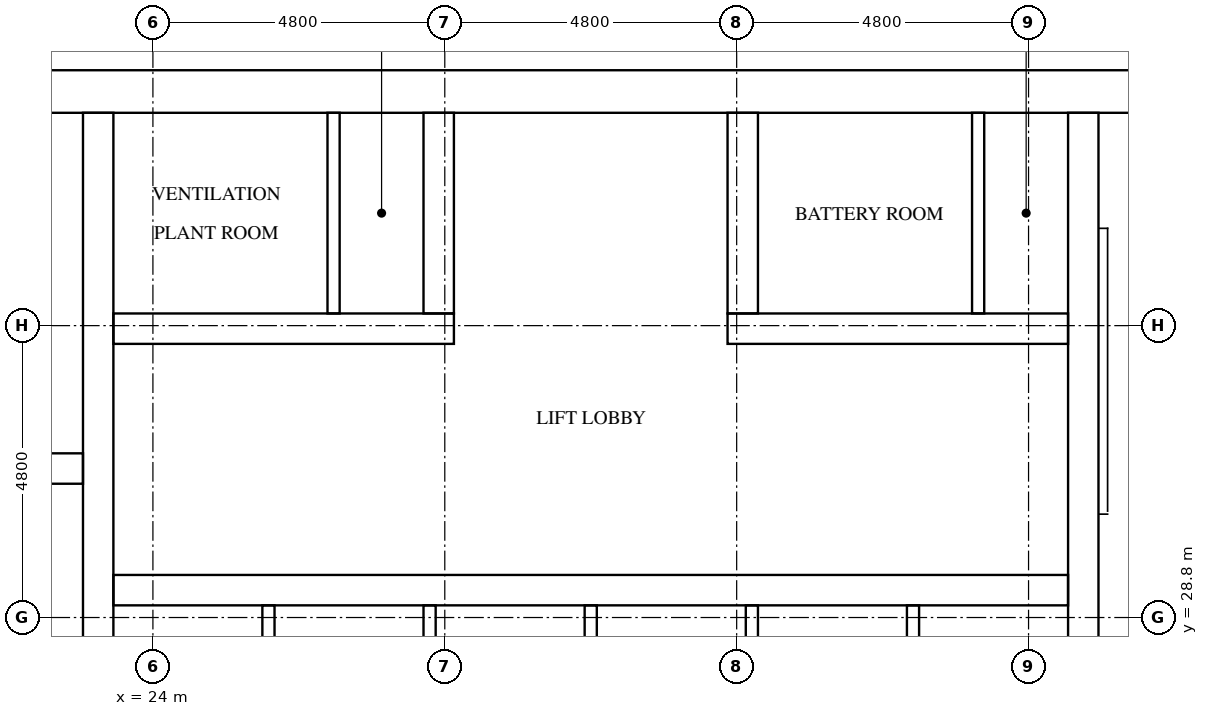
"""IFC4 building model, lengths in metres.
Left out: names, types, materials, properties, quantities, classifications, styles, units other than length and angle.
Written with IfcOpenShell. Run it as: python <this file> out.ifc"""

import sys

from ifc_helpers import new_model, si_unit, direction, frame, frame_2d, origin, place, context, subcontext, project, spatial, rectangle, extrude, element, fill, save


model = new_model("IFC4")
c1 = context("Model", 3, precision=1e-05, world=origin(), true_north=direction((0.0, 1.0)))
c2 = subcontext(c1, "Body", "Model", "MODEL_VIEW")
j1 = project(units=[si_unit("LENGTHUNIT", "METRE"), si_unit("PLANEANGLEUNIT", "RADIAN")], contexts=[c1])
p1 = place(None, origin())
s1 = spatial("IfcSite", under=j1, at=p1, CompositionType="ELEMENT")
p2 = place(p1, origin())
s2 = spatial("IfcBuilding", under=s1, at=p2, CompositionType="ELEMENT")
p3 = place(p2, frame((0.0, 0.0, 203.4)))
s3 = spatial("IfcBuildingStorey", under=s2, at=p3, CompositionType="ELEMENT", Elevation=203.4)
p4 = place(p3, frame((15.0, 37.45, 0.0), z_axis=(0.0, 0.0, 1.0), x_axis=(1.0, 0.0, 0.0)))
e1 = element("IfcWall", 1, at=p4, inside=s3, PredefinedType="SHEAR", context=c2, shape_type="SweptSolid", body=[
    extrude(rectangle(XDim=32.4, YDim=0.7, at=frame_2d((16.2, 0.0))), origin(), (0.0, 0.0, 1.0), 5.1),
])
p5 = place(p4, frame((15.3, 0.0, 0.0)))
e2 = element("IfcOpeningElement", 2, at=p5, cuts=e1, PredefinedType="OPENING", context=c2, shape_type="SweptSolid", body=[
    extrude(rectangle(XDim=1.8, YDim=2.1, at=frame_2d((0.9, 1.05))), frame((0.0, 0.36, 0.0), z_axis=(0.0, -1.0, 0.0), x_axis=(1.0, 0.0, 0.0)), (0.0, 0.0, 1.0), 0.72),
])
p6 = place(p4, frame((1.544, 0.0, 0.0)))
e3 = element("IfcOpeningElement", 3, at=p6, cuts=e1, PredefinedType="OPENING", context=c2, shape_type="SweptSolid", body=[
    extrude(rectangle(XDim=1.0, YDim=2.1, at=frame_2d((0.5, 1.05))), frame((0.0, 0.36, 0.0), z_axis=(0.0, -1.0, 0.0), x_axis=(1.0, 0.0, 0.0)), (0.0, 0.0, 1.0), 0.72),
])
p7 = place(p4, frame((5.219, 0.0, 0.0)))
e4 = element("IfcOpeningElement", 4, at=p7, cuts=e1, PredefinedType="OPENING", context=c2, shape_type="SweptSolid", body=[
    extrude(rectangle(XDim=1.0, YDim=2.1, at=frame_2d((0.5, 1.05))), frame((0.0, 0.36, 0.0), z_axis=(0.0, -1.0, 0.0), x_axis=(1.0, 0.0, 0.0)), (0.0, 0.0, 1.0), 0.72),
])
p8 = place(p3, frame((23.1, 15.7, 0.0), z_axis=(0.0, 0.0, 1.0), x_axis=(0.0, 1.0, 0.0)))
e5 = element("IfcWall", 5, at=p8, inside=s3, PredefinedType="SHEAR", context=c2, shape_type="SweptSolid", body=[
    extrude(rectangle(XDim=21.4, YDim=0.5, at=frame_2d((10.7, 0.0))), origin(), (0.0, 0.0, 1.0), 5.1),
])
p9 = place(p3, frame((39.3, 27.75, 0.0), z_axis=(0.0, 0.0, 1.0), x_axis=(0.0, 1.0, 0.0)))
e6 = element("IfcWall", 6, at=p9, inside=s3, PredefinedType="SHEAR", context=c2, shape_type="SweptSolid", body=[
    extrude(rectangle(XDim=9.35, YDim=0.5, at=frame_2d((4.675, 0.0))), origin(), (0.0, 0.0, 1.0), 5.1),
])
p10 = place(p3, frame((15.7, 31.25, 0.0), z_axis=(0.0, 0.0, 1.0), x_axis=(1.0, 0.0, 0.0)))
e7 = element("IfcWall", 7, at=p10, inside=s3, PredefinedType="SHEAR", context=c2, shape_type="SweptSolid", body=[
    extrude(rectangle(XDim=7.15, YDim=0.5, at=frame_2d((3.575, 0.0))), origin(), (0.0, 0.0, 1.0), 5.1),
])
p11 = place(p3, frame((23.35, 29.25, 0.0), z_axis=(0.0, 0.0, 1.0), x_axis=(1.0, 0.0, 0.0)))
e8 = element("IfcWall", 8, at=p11, inside=s3, PredefinedType="SHEAR", context=c2, shape_type="SweptSolid", body=[
    extrude(rectangle(XDim=15.7, YDim=0.5, at=frame_2d((7.85, 0.0))), origin(), (0.0, 0.0, 1.0), 5.1),
])
p12 = place(p11, frame((0.675, 0.0, 0.0)))
e9 = element("IfcOpeningElement", 9, at=p12, cuts=e8, PredefinedType="OPENING", context=c2, shape_type="SweptSolid", body=[
    extrude(rectangle(XDim=1.1, YDim=2.1, at=frame_2d((0.55, 1.05))), frame((0.0, 0.26, 0.0), z_axis=(0.0, -1.0, 0.0), x_axis=(1.0, 0.0, 0.0)), (0.0, 0.0, 1.0), 0.52),
])
p13 = place(p11, frame((3.325, 0.0, 0.0)))
e10 = element("IfcOpeningElement", 10, at=p13, cuts=e8, PredefinedType="OPENING", context=c2, shape_type="SweptSolid", body=[
    extrude(rectangle(XDim=1.1, YDim=2.1, at=frame_2d((0.55, 1.05))), frame((0.0, 0.26, 0.0), z_axis=(0.0, -1.0, 0.0), x_axis=(1.0, 0.0, 0.0)), (0.0, 0.0, 1.0), 0.52),
])
p14 = place(p11, frame((5.975, 0.0, 0.0)))
e11 = element("IfcOpeningElement", 11, at=p14, cuts=e8, PredefinedType="OPENING", context=c2, shape_type="SweptSolid", body=[
    extrude(rectangle(XDim=1.1, YDim=2.1, at=frame_2d((0.55, 1.05))), frame((0.0, 0.26, 0.0), z_axis=(0.0, -1.0, 0.0), x_axis=(1.0, 0.0, 0.0)), (0.0, 0.0, 1.0), 0.52),
])
p15 = place(p11, frame((8.625, 0.0, 0.0)))
e12 = element("IfcOpeningElement", 12, at=p15, cuts=e8, PredefinedType="OPENING", context=c2, shape_type="SweptSolid", body=[
    extrude(rectangle(XDim=1.1, YDim=2.1, at=frame_2d((0.55, 1.05))), frame((0.0, 0.26, 0.0), z_axis=(0.0, -1.0, 0.0), x_axis=(1.0, 0.0, 0.0)), (0.0, 0.0, 1.0), 0.52),
])
p16 = place(p11, frame((11.275, 0.0, 0.0)))
e13 = element("IfcOpeningElement", 13, at=p16, cuts=e8, PredefinedType="OPENING", context=c2, shape_type="SweptSolid", body=[
    extrude(rectangle(XDim=1.1, YDim=2.1, at=frame_2d((0.55, 1.05))), frame((0.0, 0.26, 0.0), z_axis=(0.0, -1.0, 0.0), x_axis=(1.0, 0.0, 0.0)), (0.0, 0.0, 1.0), 0.52),
])
p17 = place(p11, frame((13.925, 0.0, 0.0)))
e14 = element("IfcOpeningElement", 14, at=p17, cuts=e8, PredefinedType="OPENING", context=c2, shape_type="SweptSolid", body=[
    extrude(rectangle(XDim=1.1, YDim=2.1, at=frame_2d((0.55, 1.05))), frame((0.0, 0.26, 0.0), z_axis=(0.0, -1.0, 0.0), x_axis=(1.0, 0.0, 0.0)), (0.0, 0.0, 1.0), 0.52),
])
p18 = place(p3, frame((23.35, 33.55, 0.0), z_axis=(0.0, 0.0, 1.0), x_axis=(1.0, 0.0, 0.0)))
e15 = element("IfcWall", 15, at=p18, inside=s3, PredefinedType="SHEAR", context=c2, shape_type="SweptSolid", body=[
    extrude(rectangle(XDim=5.6, YDim=0.5, at=frame_2d((2.8, 0.0))), origin(), (0.0, 0.0, 1.0), 5.1),
])
p19 = place(p18, frame((1.26, 0.0, 0.0)))
e16 = element("IfcOpeningElement", 16, at=p19, cuts=e15, PredefinedType="OPENING", context=c2, shape_type="SweptSolid", body=[
    extrude(rectangle(XDim=1.0, YDim=2.1, at=frame_2d((0.5, 1.05))), frame((0.0, 0.26, 0.0), z_axis=(0.0, -1.0, 0.0), x_axis=(1.0, 0.0, 0.0)), (0.0, 0.0, 1.0), 0.52),
])
p20 = place(p18, frame((3.91, 0.0, 0.0)))
e17 = element("IfcOpeningElement", 17, at=p20, cuts=e15, PredefinedType="OPENING", context=c2, shape_type="SweptSolid", body=[
    extrude(rectangle(XDim=1.0, YDim=2.1, at=frame_2d((0.5, 1.05))), frame((0.0, 0.26, 0.0), z_axis=(0.0, -1.0, 0.0), x_axis=(1.0, 0.0, 0.0)), (0.0, 0.0, 1.0), 0.52),
])
p21 = place(p3, frame((33.45, 33.55, 0.0), z_axis=(0.0, 0.0, 1.0), x_axis=(1.0, 0.0, 0.0)))
e18 = element("IfcWall", 18, at=p21, inside=s3, PredefinedType="SHEAR", context=c2, shape_type="SweptSolid", body=[
    extrude(rectangle(XDim=5.6, YDim=0.5, at=frame_2d((2.8, 0.0))), origin(), (0.0, 0.0, 1.0), 5.1),
])
p22 = place(p21, frame((1.76, 0.0, 0.0)))
e19 = element("IfcOpeningElement", 19, at=p22, cuts=e18, PredefinedType="OPENING", context=c2, shape_type="SweptSolid", body=[
    extrude(rectangle(XDim=1.0, YDim=2.1, at=frame_2d((0.5, 1.05))), frame((0.0, 0.26, 0.0), z_axis=(0.0, -1.0, 0.0), x_axis=(1.0, 0.0, 0.0)), (0.0, 0.0, 1.0), 0.52),
])
p23 = place(p21, frame((4.41, 0.0, 0.0)))
e20 = element("IfcOpeningElement", 20, at=p23, cuts=e18, PredefinedType="OPENING", context=c2, shape_type="SweptSolid", body=[
    extrude(rectangle(XDim=1.0, YDim=2.1, at=frame_2d((0.5, 1.05))), frame((0.0, 0.26, 0.0), z_axis=(0.0, -1.0, 0.0), x_axis=(1.0, 0.0, 0.0)), (0.0, 0.0, 1.0), 0.52),
])
for number, where, z_axis, x_axis in (
    (21, (28.7, 33.8, 0.0), (0.0, 0.0, 1.0), (0.0, 1.0, 0.0)),
    (22, (33.7, 33.8, 0.0), (0.0, 0.0, 1.0), (0.0, 1.0, 0.0)),
):
    element("IfcWall", number, at=place(p3, frame(where, z_axis=z_axis, x_axis=x_axis)), inside=s3, PredefinedType="SHEAR", context=c2, shape_type="SweptSolid", body=[
        extrude(rectangle(XDim=3.3, YDim=0.5, at=frame_2d((1.65, 0.0))), origin(), (0.0, 0.0, 1.0), 5.1),
    ])
for number, where, z_axis, x_axis in (
    (23, (25.9, 26.4, 0.0), (0.0, 0.0, 1.0), (0.0, 1.0, 0.0)),
    (24, (28.55, 26.4, 0.0), (0.0, 0.0, 1.0), (0.0, 1.0, 0.0)),
    (25, (31.2, 26.4, 0.0), (0.0, 0.0, 1.0), (0.0, 1.0, 0.0)),
    (26, (33.85, 26.4, 0.0), (0.0, 0.0, 1.0), (0.0, 1.0, 0.0)),
    (27, (36.5, 26.4, 0.0), (0.0, 0.0, 1.0), (0.0, 1.0, 0.0)),
):
    element("IfcWall", number, at=place(p3, frame(where, z_axis=z_axis, x_axis=x_axis)), inside=s3, PredefinedType="SOLIDWALL", context=c2, shape_type="SweptSolid", body=[
        extrude(rectangle(XDim=2.6, YDim=0.2, at=frame_2d((1.3, 0.0))), origin(), (0.0, 0.0, 1.0), 5.1),
    ])
for number, where, z_axis, x_axis in (
    (28, (26.971, 33.8, 0.0), (0.0, 0.0, 1.0), (0.0, 1.0, 0.0)),
    (29, (37.571, 33.8, 0.0), (0.0, 0.0, 1.0), (0.0, 1.0, 0.0)),
):
    element("IfcWall", number, at=place(p3, frame(where, z_axis=z_axis, x_axis=x_axis)), inside=s3, PredefinedType="PARTITIONING", context=c2, shape_type="SweptSolid", body=[
        extrude(rectangle(XDim=3.3, YDim=0.2, at=frame_2d((1.65, 0.0))), origin(), (0.0, 0.0, 1.0), 5.1),
    ])
p24 = place(p12, origin())
e30 = element("IfcDoor", 30, at=p24, inside=s3, OperationType="DOUBLE_DOOR_SLIDING", PredefinedType="DOOR", context=c2, shape_type="SweptSolid", body=[
    extrude(rectangle(XDim=1.1, YDim=2.1, at=frame_2d((0.55, 1.05))), frame((0.0, 0.025, 0.0), z_axis=(0.0, -1.0, 0.0), x_axis=(1.0, 0.0, 0.0)), (0.0, 0.0, 1.0), 0.05),
])
fill(e9, e30)
p25 = place(p13, origin())
e31 = element("IfcDoor", 31, at=p25, inside=s3, OperationType="DOUBLE_DOOR_SLIDING", PredefinedType="DOOR", context=c2, shape_type="SweptSolid", body=[
    extrude(rectangle(XDim=1.1, YDim=2.1, at=frame_2d((0.55, 1.05))), frame((0.0, 0.025, 0.0), z_axis=(0.0, -1.0, 0.0), x_axis=(1.0, 0.0, 0.0)), (0.0, 0.0, 1.0), 0.05),
])
fill(e10, e31)
p26 = place(p14, origin())
e32 = element("IfcDoor", 32, at=p26, inside=s3, OperationType="DOUBLE_DOOR_SLIDING", PredefinedType="DOOR", context=c2, shape_type="SweptSolid", body=[
    extrude(rectangle(XDim=1.1, YDim=2.1, at=frame_2d((0.55, 1.05))), frame((0.0, 0.025, 0.0), z_axis=(0.0, -1.0, 0.0), x_axis=(1.0, 0.0, 0.0)), (0.0, 0.0, 1.0), 0.05),
])
fill(e11, e32)
p27 = place(p15, origin())
e33 = element("IfcDoor", 33, at=p27, inside=s3, OperationType="DOUBLE_DOOR_SLIDING", PredefinedType="DOOR", context=c2, shape_type="SweptSolid", body=[
    extrude(rectangle(XDim=1.1, YDim=2.1, at=frame_2d((0.55, 1.05))), frame((0.0, 0.025, 0.0), z_axis=(0.0, -1.0, 0.0), x_axis=(1.0, 0.0, 0.0)), (0.0, 0.0, 1.0), 0.05),
])
fill(e12, e33)
p28 = place(p16, origin())
e34 = element("IfcDoor", 34, at=p28, inside=s3, OperationType="DOUBLE_DOOR_SLIDING", PredefinedType="DOOR", context=c2, shape_type="SweptSolid", body=[
    extrude(rectangle(XDim=1.1, YDim=2.1, at=frame_2d((0.55, 1.05))), frame((0.0, 0.025, 0.0), z_axis=(0.0, -1.0, 0.0), x_axis=(1.0, 0.0, 0.0)), (0.0, 0.0, 1.0), 0.05),
])
fill(e13, e34)
p29 = place(p17, origin())
e35 = element("IfcDoor", 35, at=p29, inside=s3, OperationType="DOUBLE_DOOR_SLIDING", PredefinedType="DOOR", context=c2, shape_type="SweptSolid", body=[
    extrude(rectangle(XDim=1.1, YDim=2.1, at=frame_2d((0.55, 1.05))), frame((0.0, 0.025, 0.0), z_axis=(0.0, -1.0, 0.0), x_axis=(1.0, 0.0, 0.0)), (0.0, 0.0, 1.0), 0.05),
])
fill(e14, e35)
p30 = place(p5, origin())
e36 = element("IfcDoor", 36, at=p30, inside=s3, OperationType="DOUBLE_DOOR_SINGLE_SWING", PredefinedType="DOOR", context=c2, shape_type="SweptSolid", body=[
    extrude(rectangle(XDim=1.8, YDim=2.1, at=frame_2d((0.9, 1.05))), frame((0.0, 0.025, 0.0), z_axis=(0.0, -1.0, 0.0), x_axis=(1.0, 0.0, 0.0)), (0.0, 0.0, 1.0), 0.05),
])
fill(e2, e36)
p31 = place(p19, frame((1.0, 0.0, 0.0), z_axis=(0.0, 0.0, 1.0), x_axis=(-1.0, 0.0, 0.0)))
e37 = element("IfcDoor", 37, at=p31, inside=s3, OperationType="SINGLE_SWING_LEFT", PredefinedType="DOOR", context=c2, shape_type="SweptSolid", body=[
    extrude(rectangle(XDim=1.0, YDim=2.1, at=frame_2d((0.5, 1.05))), frame((0.0, 0.025, 0.0), z_axis=(0.0, -1.0, 0.0), x_axis=(1.0, 0.0, 0.0)), (0.0, 0.0, 1.0), 0.05),
])
fill(e16, e37)
p32 = place(p20, frame((1.0, 0.0, 0.0), z_axis=(0.0, 0.0, 1.0), x_axis=(-1.0, 0.0, 0.0)))
e38 = element("IfcDoor", 38, at=p32, inside=s3, OperationType="SINGLE_SWING_RIGHT", PredefinedType="DOOR", context=c2, shape_type="SweptSolid", body=[
    extrude(rectangle(XDim=1.0, YDim=2.1, at=frame_2d((0.5, 1.05))), frame((0.0, 0.025, 0.0), z_axis=(0.0, -1.0, 0.0), x_axis=(1.0, 0.0, 0.0)), (0.0, 0.0, 1.0), 0.05),
])
fill(e17, e38)
p33 = place(p22, frame((1.0, 0.0, 0.0), z_axis=(0.0, 0.0, 1.0), x_axis=(-1.0, 0.0, 0.0)))
e39 = element("IfcDoor", 39, at=p33, inside=s3, OperationType="SINGLE_SWING_LEFT", PredefinedType="DOOR", context=c2, shape_type="SweptSolid", body=[
    extrude(rectangle(XDim=1.0, YDim=2.1, at=frame_2d((0.5, 1.05))), frame((0.0, 0.025, 0.0), z_axis=(0.0, -1.0, 0.0), x_axis=(1.0, 0.0, 0.0)), (0.0, 0.0, 1.0), 0.05),
])
fill(e19, e39)
p34 = place(p23, frame((1.0, 0.0, 0.0), z_axis=(0.0, 0.0, 1.0), x_axis=(-1.0, 0.0, 0.0)))
e40 = element("IfcDoor", 40, at=p34, inside=s3, OperationType="SINGLE_SWING_RIGHT", PredefinedType="DOOR", context=c2, shape_type="SweptSolid", body=[
    extrude(rectangle(XDim=1.0, YDim=2.1, at=frame_2d((0.5, 1.05))), frame((0.0, 0.025, 0.0), z_axis=(0.0, -1.0, 0.0), x_axis=(1.0, 0.0, 0.0)), (0.0, 0.0, 1.0), 0.05),
])
fill(e20, e40)
save(model, sys.argv[1])
